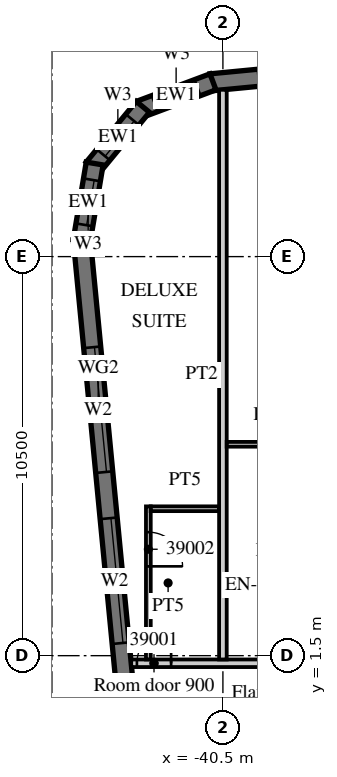
"""IFC4 building model, lengths in metres.
Left out: names, types, materials, properties, quantities, classifications, styles, units other than length and angle.
Written with IfcOpenShell. Run it as: python <this file> out.ifc"""

import sys

from ifc_helpers import new_model, si_unit, direction, frame, frame_2d, origin, place, context, subcontext, project, spatial, polyline, rectangle, outline, extrude, element, fill, save


model = new_model("IFC4")
c1 = context("Model", 3, precision=1e-05, world=origin(), true_north=direction((0.0, 1.0)))
c2 = subcontext(c1, "Body", "Model", "MODEL_VIEW")
j1 = project(units=[si_unit("LENGTHUNIT", "METRE"), si_unit("PLANEANGLEUNIT", "RADIAN")], contexts=[c1])
p1 = place(None, origin())
s1 = spatial("IfcSite", under=j1, at=p1, CompositionType="ELEMENT")
p2 = place(p1, origin())
s2 = spatial("IfcBuilding", under=s1, at=p2, CompositionType="ELEMENT")
p3 = place(p2, frame((0.0, 0.0, 170.2)))
s3 = spatial("IfcBuildingStorey", under=s2, at=p3, CompositionType="ELEMENT", Elevation=170.2)
p4 = place(p3, frame((-44.214, 12.466, 0.0), z_axis=(0.0, 0.0, 1.0), x_axis=(0.095847314626, -0.995396047952, 0.0)))
e1 = element("IfcWall", 1, at=p4, inside=s3, PredefinedType="SOLIDWALL", context=c2, shape_type="SweptSolid", body=[
    extrude(rectangle(XDim=34.0, YDim=0.45, at=frame_2d((17.0, 0.0))), origin(), (0.0, 0.0, 1.0), 3.02),
])
p5 = place(p4, frame((2.865, 0.0, 0.45)))
e2 = element("IfcOpeningElement", 2, at=p5, cuts=e1, PredefinedType="OPENING", context=c2, shape_type="SweptSolid", body=[
    extrude(rectangle(XDim=3.3, YDim=2.25, at=frame_2d((1.65, 1.125))), frame((0.0, 0.235, 0.0), z_axis=(0.0, -1.0, 0.0), x_axis=(1.0, 0.0, 0.0)), (0.0, 0.0, 1.0), 0.47),
])
p6 = place(p4, frame((7.386, 0.0, 0.45)))
e3 = element("IfcOpeningElement", 3, at=p6, cuts=e1, PredefinedType="OPENING", context=c2, shape_type="SweptSolid", body=[
    extrude(rectangle(XDim=3.3, YDim=2.25, at=frame_2d((1.65, 1.125))), frame((0.0, 0.235, 0.0), z_axis=(0.0, -1.0, 0.0), x_axis=(1.0, 0.0, 0.0)), (0.0, 0.0, 1.0), 0.47),
])
p7 = place(p3, frame((13.521, 21.817, 0.0), z_axis=(0.0, 0.0, 1.0), x_axis=(-0.995396508751, -0.095842529008, 0.0)))
e4 = element("IfcWall", 4, at=p7, inside=s3, PredefinedType="SOLIDWALL", context=c2, shape_type="SweptSolid", body=[
    extrude(rectangle(XDim=54.591, YDim=0.45, at=frame_2d((27.296, 0.0))), origin(), (0.0, 0.0, 1.0), 3.02),
])
p8 = place(p7, frame((0.91, 0.0, 0.45)))
e5 = element("IfcOpeningElement", 5, at=p8, cuts=e4, PredefinedType="OPENING", context=c2, shape_type="SweptSolid", body=[
    extrude(rectangle(XDim=2.7, YDim=2.25, at=frame_2d((1.35, 1.125))), frame((0.0, 0.235, 0.0), z_axis=(0.0, -1.0, 0.0), x_axis=(1.0, 0.0, 0.0)), (0.0, 0.0, 1.0), 0.47),
])
p9 = place(p7, frame((5.431, 0.0, 0.45)))
e6 = element("IfcOpeningElement", 6, at=p9, cuts=e4, PredefinedType="OPENING", context=c2, shape_type="SweptSolid", body=[
    extrude(rectangle(XDim=2.7, YDim=2.25, at=frame_2d((1.35, 1.125))), frame((0.0, 0.235, 0.0), z_axis=(0.0, -1.0, 0.0), x_axis=(1.0, 0.0, 0.0)), (0.0, 0.0, 1.0), 0.47),
])
p10 = place(p7, frame((9.952, 0.0, 0.45)))
e7 = element("IfcOpeningElement", 7, at=p10, cuts=e4, PredefinedType="OPENING", context=c2, shape_type="SweptSolid", body=[
    extrude(rectangle(XDim=2.7, YDim=2.25, at=frame_2d((1.35, 1.125))), frame((0.0, 0.235, 0.0), z_axis=(0.0, -1.0, 0.0), x_axis=(1.0, 0.0, 0.0)), (0.0, 0.0, 1.0), 0.47),
])
p11 = place(p7, frame((14.473, 0.0, 0.45)))
e8 = element("IfcOpeningElement", 8, at=p11, cuts=e4, PredefinedType="OPENING", context=c2, shape_type="SweptSolid", body=[
    extrude(rectangle(XDim=2.7, YDim=2.25, at=frame_2d((1.35, 1.125))), frame((0.0, 0.235, 0.0), z_axis=(0.0, -1.0, 0.0), x_axis=(1.0, 0.0, 0.0)), (0.0, 0.0, 1.0), 0.47),
])
p12 = place(p7, frame((18.994, 0.0, 0.45)))
e9 = element("IfcOpeningElement", 9, at=p12, cuts=e4, PredefinedType="OPENING", context=c2, shape_type="SweptSolid", body=[
    extrude(rectangle(XDim=2.7, YDim=2.25, at=frame_2d((1.35, 1.125))), frame((0.0, 0.235, 0.0), z_axis=(0.0, -1.0, 0.0), x_axis=(1.0, 0.0, 0.0)), (0.0, 0.0, 1.0), 0.47),
])
p13 = place(p7, frame((23.514, 0.0, 0.45)))
e10 = element("IfcOpeningElement", 10, at=p13, cuts=e4, PredefinedType="OPENING", context=c2, shape_type="SweptSolid", body=[
    extrude(rectangle(XDim=2.7, YDim=2.25, at=frame_2d((1.35, 1.125))), frame((0.0, 0.235, 0.0), z_axis=(0.0, -1.0, 0.0), x_axis=(1.0, 0.0, 0.0)), (0.0, 0.0, 1.0), 0.47),
])
p14 = place(p7, frame((28.035, 0.0, 0.45)))
e11 = element("IfcOpeningElement", 11, at=p14, cuts=e4, PredefinedType="OPENING", context=c2, shape_type="SweptSolid", body=[
    extrude(rectangle(XDim=2.7, YDim=2.25, at=frame_2d((1.35, 1.125))), frame((0.0, 0.235, 0.0), z_axis=(0.0, -1.0, 0.0), x_axis=(1.0, 0.0, 0.0)), (0.0, 0.0, 1.0), 0.47),
])
p15 = place(p7, frame((32.556, 0.0, 0.45)))
e12 = element("IfcOpeningElement", 12, at=p15, cuts=e4, PredefinedType="OPENING", context=c2, shape_type="SweptSolid", body=[
    extrude(rectangle(XDim=2.7, YDim=2.25, at=frame_2d((1.35, 1.125))), frame((0.0, 0.235, 0.0), z_axis=(0.0, -1.0, 0.0), x_axis=(1.0, 0.0, 0.0)), (0.0, 0.0, 1.0), 0.47),
])
p16 = place(p7, frame((37.077, 0.0, 0.45)))
e13 = element("IfcOpeningElement", 13, at=p16, cuts=e4, PredefinedType="OPENING", context=c2, shape_type="SweptSolid", body=[
    extrude(rectangle(XDim=2.7, YDim=2.25, at=frame_2d((1.35, 1.125))), frame((0.0, 0.235, 0.0), z_axis=(0.0, -1.0, 0.0), x_axis=(1.0, 0.0, 0.0)), (0.0, 0.0, 1.0), 0.47),
])
p17 = place(p7, frame((41.598, 0.0, 0.45)))
e14 = element("IfcOpeningElement", 14, at=p17, cuts=e4, PredefinedType="OPENING", context=c2, shape_type="SweptSolid", body=[
    extrude(rectangle(XDim=2.7, YDim=2.25, at=frame_2d((1.35, 1.125))), frame((0.0, 0.235, 0.0), z_axis=(0.0, -1.0, 0.0), x_axis=(1.0, 0.0, 0.0)), (0.0, 0.0, 1.0), 0.47),
])
p18 = place(p7, frame((46.118, 0.0, 0.45)))
e15 = element("IfcOpeningElement", 15, at=p18, cuts=e4, PredefinedType="OPENING", context=c2, shape_type="SweptSolid", body=[
    extrude(rectangle(XDim=2.7, YDim=2.25, at=frame_2d((1.35, 1.125))), frame((0.0, 0.235, 0.0), z_axis=(0.0, -1.0, 0.0), x_axis=(1.0, 0.0, 0.0)), (0.0, 0.0, 1.0), 0.47),
])
p19 = place(p7, frame((50.629, 0.0, 0.45)))
e16 = element("IfcOpeningElement", 16, at=p19, cuts=e4, PredefinedType="OPENING", context=c2, shape_type="SweptSolid", body=[
    extrude(rectangle(XDim=2.7, YDim=2.25, at=frame_2d((1.35, 1.125))), frame((0.0, 0.235, 0.0), z_axis=(0.0, -1.0, 0.0), x_axis=(1.0, 0.0, 0.0)), (0.0, 0.0, 1.0), 0.47),
])
p20 = place(p3, frame((-40.761, 16.598, 0.0), z_axis=(0.0, 0.0, 1.0), x_axis=(-0.936677599948, -0.350192909346, 0.0)))
e17 = element("IfcWall", 17, at=p20, inside=s3, PredefinedType="SOLIDWALL", context=c2, shape_type="SweptSolid", body=[
    extrude(outline(polyline([(0.0, -0.225), (2.071, -0.225), (1.95, 0.225), (0.121, 0.225), (0.0, -0.225)])), origin(), (0.0, 0.0, 1.0), 3.02),
])
p21 = place(p20, frame((0.435, 0.0, 0.45)))
e18 = element("IfcOpeningElement", 18, at=p21, cuts=e17, PredefinedType="OPENING", context=c2, shape_type="SweptSolid", body=[
    extrude(rectangle(XDim=1.2, YDim=2.25, at=frame_2d((0.6, 1.125))), frame((0.0, 0.235, 0.0), z_axis=(0.0, -1.0, 0.0), x_axis=(1.0, 0.0, 0.0)), (0.0, 0.0, 1.0), 0.47),
])
p22 = place(p3, frame((-42.606, 15.941, 0.0), z_axis=(0.0, 0.0, 1.0), x_axis=(-0.636116318187, -0.771593176315, 0.0)))
e19 = element("IfcWall", 19, at=p22, inside=s3, PredefinedType="SOLIDWALL", context=c2, shape_type="SweptSolid", body=[
    extrude(outline(polyline([(0.0, -0.225), (2.071, -0.225), (1.95, 0.225), (0.121, 0.225), (0.0, -0.225)])), origin(), (0.0, 0.0, 1.0), 3.02),
])
p23 = place(p22, frame((0.435, 0.0, 0.45)))
e20 = element("IfcOpeningElement", 20, at=p23, cuts=e19, PredefinedType="OPENING", context=c2, shape_type="SweptSolid", body=[
    extrude(rectangle(XDim=1.2, YDim=2.25, at=frame_2d((0.6, 1.125))), frame((0.0, 0.235, 0.0), z_axis=(0.0, -1.0, 0.0), x_axis=(1.0, 0.0, 0.0)), (0.0, 0.0, 1.0), 0.47),
])
p24 = place(p3, frame((-43.875, 14.449, 0.0), z_axis=(0.0, 0.0, 1.0), x_axis=(-0.164953448126, -0.986301353518, 0.0)))
e21 = element("IfcWall", 21, at=p24, inside=s3, PredefinedType="SOLIDWALL", context=c2, shape_type="SweptSolid", body=[
    extrude(outline(polyline([(0.0, -0.225), (2.071, -0.225), (1.95, 0.225), (0.121, 0.225), (0.0, -0.225)])), origin(), (0.0, 0.0, 1.0), 3.02),
])
p25 = place(p24, frame((0.435, 0.0, 0.45)))
e22 = element("IfcOpeningElement", 22, at=p25, cuts=e21, PredefinedType="OPENING", context=c2, shape_type="SweptSolid", body=[
    extrude(rectangle(XDim=1.2, YDim=2.25, at=frame_2d((0.6, 1.125))), frame((0.0, 0.235, 0.0), z_axis=(0.0, -1.0, 0.0), x_axis=(1.0, 0.0, 0.0)), (0.0, 0.0, 1.0), 0.47),
])
p26 = place(p3, frame((-42.913, 1.3, 0.0), z_axis=(0.0, 0.0, 1.0), x_axis=(1.0, 0.0, 0.0)))
e23 = element("IfcWall", 23, at=p26, inside=s3, PredefinedType="PARTITIONING", context=c2, shape_type="SweptSolid", body=[
    extrude(rectangle(XDim=29.413, YDim=0.2, at=frame_2d((14.707, 0.0))), origin(), (0.0, 0.0, 1.0), 3.02),
])
p27 = place(p26, frame((0.15, 0.0, 0.0)))
e24 = element("IfcOpeningElement", 24, at=p27, cuts=e23, PredefinedType="OPENING", context=c2, shape_type="SweptSolid", body=[
    extrude(rectangle(XDim=0.9, YDim=2.1, at=frame_2d((0.45, 1.05))), frame((0.0, 0.11, 0.0), z_axis=(0.0, -1.0, 0.0), x_axis=(1.0, 0.0, 0.0)), (0.0, 0.0, 1.0), 0.22),
])
p28 = place(p26, frame((5.338, 0.0, 0.0)))
e25 = element("IfcOpeningElement", 25, at=p28, cuts=e23, PredefinedType="OPENING", context=c2, shape_type="SweptSolid", body=[
    extrude(rectangle(XDim=1.0, YDim=2.1, at=frame_2d((0.5, 1.05))), frame((0.0, 0.11, 0.0), z_axis=(0.0, -1.0, 0.0), x_axis=(1.0, 0.0, 0.0)), (0.0, 0.0, 1.0), 0.22),
])
p29 = place(p26, frame((7.488, 0.0, 0.0)))
e26 = element("IfcOpeningElement", 26, at=p29, cuts=e23, PredefinedType="OPENING", context=c2, shape_type="SweptSolid", body=[
    extrude(rectangle(XDim=1.0, YDim=2.1, at=frame_2d((0.5, 1.05))), frame((0.0, 0.11, 0.0), z_axis=(0.0, -1.0, 0.0), x_axis=(1.0, 0.0, 0.0)), (0.0, 0.0, 1.0), 0.22),
])
p30 = place(p26, frame((11.963, 0.0, 0.0)))
e27 = element("IfcOpeningElement", 27, at=p30, cuts=e23, PredefinedType="OPENING", context=c2, shape_type="SweptSolid", body=[
    extrude(rectangle(XDim=1.0, YDim=2.1, at=frame_2d((0.5, 1.05))), frame((0.0, 0.11, 0.0), z_axis=(0.0, -1.0, 0.0), x_axis=(1.0, 0.0, 0.0)), (0.0, 0.0, 1.0), 0.22),
])
p31 = place(p26, frame((21.275, 0.0, 0.0)))
e28 = element("IfcOpeningElement", 28, at=p31, cuts=e23, PredefinedType="OPENING", context=c2, shape_type="SweptSolid", body=[
    extrude(rectangle(XDim=1.2, YDim=2.1, at=frame_2d((0.6, 1.05))), frame((0.0, 0.11, 0.0), z_axis=(0.0, -1.0, 0.0), x_axis=(1.0, 0.0, 0.0)), (0.0, 0.0, 1.0), 0.22),
])
p32 = place(p26, frame((27.838, 0.0, 0.0)))
e29 = element("IfcOpeningElement", 29, at=p32, cuts=e23, PredefinedType="OPENING", context=c2, shape_type="SweptSolid", body=[
    extrude(rectangle(XDim=1.0, YDim=2.1, at=frame_2d((0.5, 1.05))), frame((0.0, 0.11, 0.0), z_axis=(0.0, -1.0, 0.0), x_axis=(1.0, 0.0, 0.0)), (0.0, 0.0, 1.0), 0.22),
])
p33 = place(p3, frame((-40.5, 1.4, 0.0), z_axis=(0.0, 0.0, 1.0), x_axis=(0.0, 1.0, 0.0)))
e30 = element("IfcWall", 30, at=p33, inside=s3, PredefinedType="PARTITIONING", context=c2, shape_type="SweptSolid", body=[
    extrude(rectangle(XDim=14.99, YDim=0.2, at=frame_2d((7.495, 0.0))), origin(), (0.0, 0.0, 1.0), 3.02),
])
p34 = place(p3, frame((-42.462, 1.4, 0.0), z_axis=(0.0, 0.0, 1.0), x_axis=(0.0, 1.0, 0.0)))
e31 = element("IfcWall", 31, at=p34, inside=s3, PredefinedType="PARTITIONING", context=c2, shape_type="SweptSolid", body=[
    extrude(rectangle(XDim=4.028, YDim=0.125, at=frame_2d((2.014, 0.0))), origin(), (0.0, 0.0, 1.0), 3.02),
])
p35 = place(p34, frame((2.45, 0.0, 0.0)))
e32 = element("IfcOpeningElement", 32, at=p35, cuts=e31, PredefinedType="OPENING", context=c2, shape_type="SweptSolid", body=[
    extrude(rectangle(XDim=0.9, YDim=2.1, at=frame_2d((0.45, 1.05))), frame((0.0, 0.073, 0.0), z_axis=(0.0, -1.0, 0.0), x_axis=(1.0, 0.0, 0.0)), (0.0, 0.0, 1.0), 0.145),
])
p36 = place(p3, frame((-42.4, 5.366, 0.0), z_axis=(0.0, 0.0, 1.0), x_axis=(1.0, 0.0, 0.0)))
e33 = element("IfcWall", 33, at=p36, inside=s3, PredefinedType="PARTITIONING", context=c2, shape_type="SweptSolid", body=[
    extrude(rectangle(XDim=1.8, YDim=0.125, at=frame_2d((0.9, 0.0))), origin(), (0.0, 0.0, 1.0), 3.02),
])
p37 = place(p3, frame((-40.4, 7.062, 0.0), z_axis=(0.0, 0.0, 1.0), x_axis=(1.0, 0.0, 0.0)))
e34 = element("IfcWall", 34, at=p37, inside=s3, PredefinedType="PARTITIONING", context=c2, shape_type="SweptSolid", body=[
    extrude(rectangle(XDim=2.25, YDim=0.125, at=frame_2d((1.125, 0.0))), origin(), (0.0, 0.0, 1.0), 3.02),
])
p38 = place(p5, origin())
e35 = element("IfcWindow", 35, at=p38, inside=s3, PartitioningType="SINGLE_PANEL", PredefinedType="WINDOW", context=c2, shape_type="SweptSolid", body=[
    extrude(rectangle(XDim=3.3, YDim=2.25, at=frame_2d((1.65, 1.125))), frame((0.0, 0.09, 0.0), z_axis=(0.0, -1.0, 0.0), x_axis=(1.0, 0.0, 0.0)), (0.0, 0.0, 1.0), 0.06),
])
fill(e2, e35)
p39 = place(p6, origin())
e36 = element("IfcWindow", 36, at=p39, inside=s3, PartitioningType="SINGLE_PANEL", PredefinedType="WINDOW", context=c2, shape_type="SweptSolid", body=[
    extrude(rectangle(XDim=3.3, YDim=2.25, at=frame_2d((1.65, 1.125))), frame((0.0, 0.09, 0.0), z_axis=(0.0, -1.0, 0.0), x_axis=(1.0, 0.0, 0.0)), (0.0, 0.0, 1.0), 0.06),
])
fill(e3, e36)
p40 = place(p21, origin())
e37 = element("IfcWindow", 37, at=p40, inside=s3, PartitioningType="SINGLE_PANEL", PredefinedType="WINDOW", context=c2, shape_type="SweptSolid", body=[
    extrude(rectangle(XDim=1.2, YDim=2.25, at=frame_2d((0.6, 1.125))), frame((0.0, 0.09, 0.0), z_axis=(0.0, -1.0, 0.0), x_axis=(1.0, 0.0, 0.0)), (0.0, 0.0, 1.0), 0.06),
])
fill(e18, e37)
p41 = place(p23, origin())
e38 = element("IfcWindow", 38, at=p41, inside=s3, PartitioningType="SINGLE_PANEL", PredefinedType="WINDOW", context=c2, shape_type="SweptSolid", body=[
    extrude(rectangle(XDim=1.2, YDim=2.25, at=frame_2d((0.6, 1.125))), frame((0.0, 0.09, 0.0), z_axis=(0.0, -1.0, 0.0), x_axis=(1.0, 0.0, 0.0)), (0.0, 0.0, 1.0), 0.06),
])
fill(e20, e38)
p42 = place(p25, origin())
e39 = element("IfcWindow", 39, at=p42, inside=s3, PartitioningType="SINGLE_PANEL", PredefinedType="WINDOW", context=c2, shape_type="SweptSolid", body=[
    extrude(rectangle(XDim=1.2, YDim=2.25, at=frame_2d((0.6, 1.125))), frame((0.0, 0.09, 0.0), z_axis=(0.0, -1.0, 0.0), x_axis=(1.0, 0.0, 0.0)), (0.0, 0.0, 1.0), 0.06),
])
fill(e22, e39)
p43 = place(p27, origin())
e40 = element("IfcDoor", 40, at=p43, inside=s3, OperationType="SINGLE_SWING_RIGHT", PredefinedType="DOOR", context=c2, shape_type="SweptSolid", body=[
    extrude(rectangle(XDim=0.9, YDim=2.1, at=frame_2d((0.45, 1.05))), frame((0.0, 0.025, 0.0), z_axis=(0.0, -1.0, 0.0), x_axis=(1.0, 0.0, 0.0)), (0.0, 0.0, 1.0), 0.05),
])
fill(e24, e40)
p44 = place(p35, origin())
e41 = element("IfcDoor", 41, at=p44, inside=s3, OperationType="SINGLE_SWING_LEFT", PredefinedType="DOOR", context=c2, shape_type="SweptSolid", body=[
    extrude(rectangle(XDim=0.9, YDim=2.1, at=frame_2d((0.45, 1.05))), frame((0.0, 0.025, 0.0), z_axis=(0.0, -1.0, 0.0), x_axis=(1.0, 0.0, 0.0)), (0.0, 0.0, 1.0), 0.05),
])
fill(e32, e41)
save(model, sys.argv[1])
